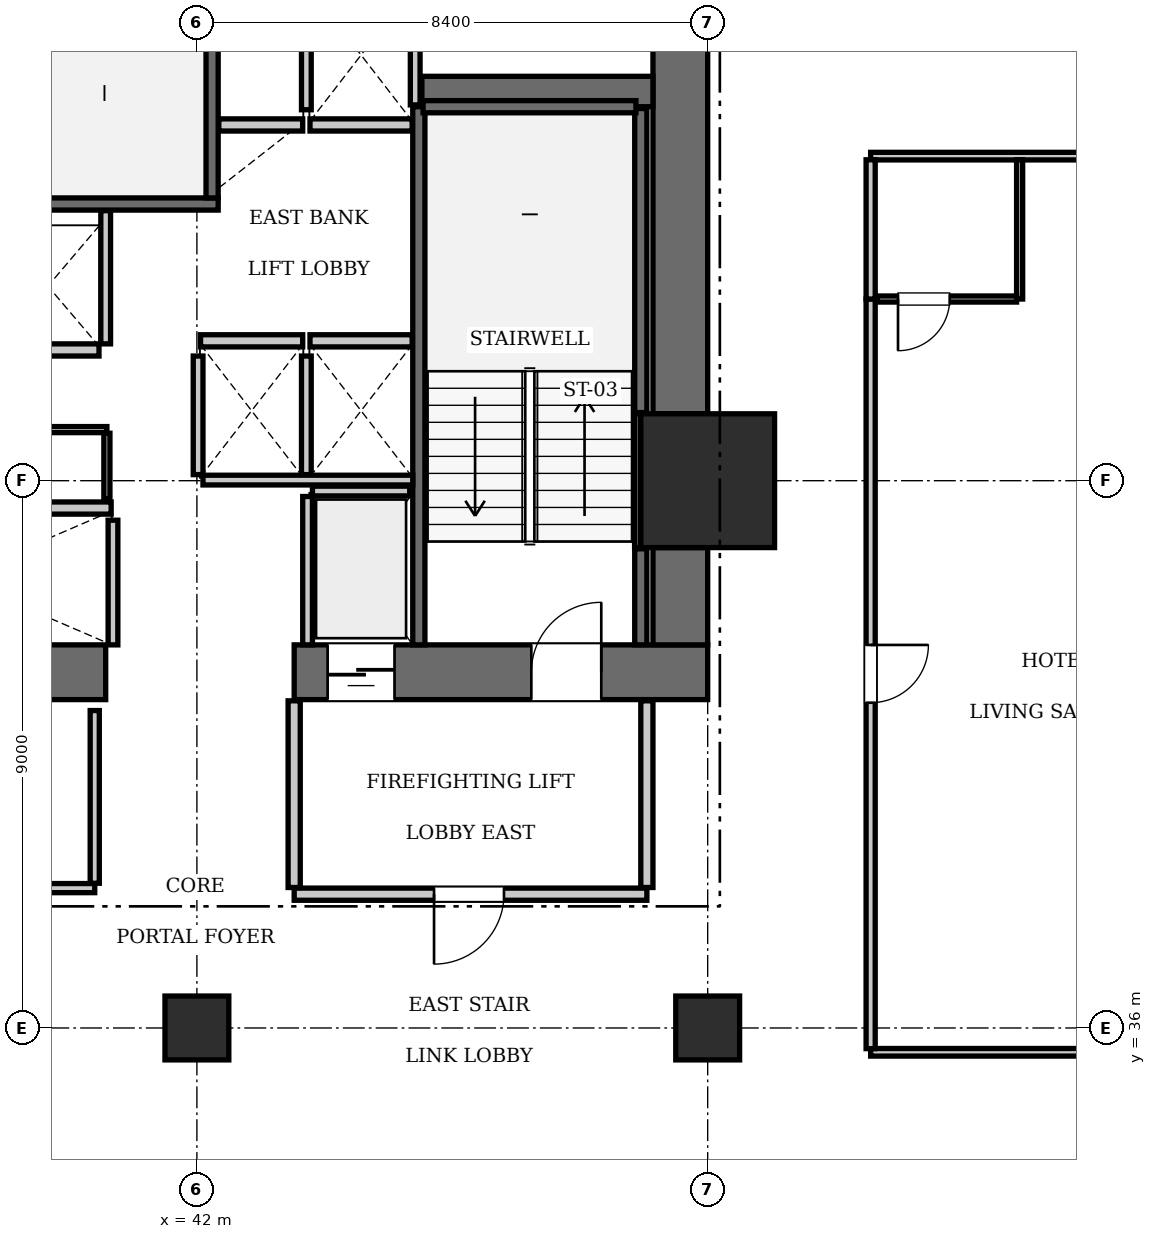
"""IFC4 building model, lengths in metres.
Left out: names, types, materials, properties, quantities, classifications, styles, units other than length and angle.
Written with IfcOpenShell. Run it as: python <this file> out.ifc"""

import sys

from ifc_helpers import new_model, si_unit, direction, frame, frame_2d, origin, origin_2d, place, context, subcontext, project, spatial, rectangle, extrude, element, fill, save


model = new_model("IFC4")
c1 = context("Model", 3, precision=1e-05, world=origin(), true_north=direction((0.0, 1.0)))
c2 = subcontext(c1, "Body", "Model", "MODEL_VIEW")
j1 = project(units=[si_unit("LENGTHUNIT", "METRE"), si_unit("PLANEANGLEUNIT", "RADIAN")], contexts=[c1])
p1 = place(None, origin())
s1 = spatial("IfcSite", under=j1, at=p1, CompositionType="ELEMENT")
p2 = place(p1, origin())
s2 = spatial("IfcBuilding", under=s1, at=p2, CompositionType="ELEMENT")
p3 = place(p2, frame((0.0, 0.0, 65.45)))
s3 = spatial("IfcBuildingStorey", under=s2, at=p3, CompositionType="ELEMENT", Elevation=65.45)
p4 = place(p3, frame((50.4, 45.0, 0.0), z_axis=(0.0, 0.0, 1.0), x_axis=(1.0, 0.0, 0.0)))
e1 = element("IfcColumn", 1, at=p4, inside=s3, PredefinedType="COLUMN", context=c2, shape_type="SweptSolid", body=[
    extrude(rectangle(XDim=2.2, YDim=2.2, at=origin_2d()), origin(), (0.0, 0.0, 1.0), 3.85),
])
p5 = place(p3, frame((35.1, 41.85, 0.0), z_axis=(0.0, 0.0, 1.0), x_axis=(1.0, 0.0, 0.0)))
e2 = element("IfcWall", 2, at=p5, inside=s3, PredefinedType="SHEAR", context=c2, shape_type="SweptSolid", body=[
    extrude(rectangle(XDim=5.4, YDim=0.9, at=frame_2d((2.7, 0.0))), origin(), (0.0, 0.0, 1.0), 3.85),
])
p6 = place(p3, frame((43.6, 41.85, 0.0), z_axis=(0.0, 0.0, 1.0), x_axis=(1.0, 0.0, 0.0)))
e3 = element("IfcWall", 3, at=p6, inside=s3, PredefinedType="SHEAR", context=c2, shape_type="SweptSolid", body=[
    extrude(rectangle(XDim=6.8, YDim=0.9, at=frame_2d((3.4, 0.0))), origin(), (0.0, 0.0, 1.0), 3.85),
])
p7 = place(p6, frame((3.9, 0.0, 0.0)))
e4 = element("IfcOpeningElement", 4, at=p7, cuts=e3, PredefinedType="OPENING", context=c2, shape_type="SweptSolid", body=[
    extrude(rectangle(XDim=1.15, YDim=2.15, at=frame_2d((0.575, 1.075))), frame((0.0, 0.46, 0.0), z_axis=(0.0, -1.0, 0.0), x_axis=(1.0, 0.0, 0.0)), (0.0, 0.0, 1.0), 0.92),
])
p8 = place(p6, frame((0.55, 0.0, 0.0)))
e5 = element("IfcOpeningElement", 5, at=p8, cuts=e3, PredefinedType="OPENING", context=c2, shape_type="SweptSolid", body=[
    extrude(rectangle(XDim=1.1, YDim=2.2, at=frame_2d((0.55, 1.1))), frame((0.0, 0.46, 0.0), z_axis=(0.0, -1.0, 0.0), x_axis=(1.0, 0.0, 0.0)), (0.0, 0.0, 1.0), 0.92),
])
p9 = place(p3, frame((49.95, 42.3, 0.0), z_axis=(0.0, 0.0, 1.0), x_axis=(0.0, 1.0, 0.0)))
e6 = element("IfcWall", 6, at=p9, inside=s3, PredefinedType="SHEAR", context=c2, shape_type="SweptSolid", body=[
    extrude(rectangle(XDim=1.6, YDim=0.9, at=frame_2d((0.8, 0.0))), origin(), (0.0, 0.0, 1.0), 3.85),
])
p10 = place(p3, frame((49.95, 46.1, 0.0), z_axis=(0.0, 0.0, 1.0), x_axis=(0.0, 1.0, 0.0)))
e7 = element("IfcWall", 7, at=p10, inside=s3, PredefinedType="SHEAR", context=c2, shape_type="SweptSolid", body=[
    extrude(rectangle(XDim=7.0, YDim=0.9, at=frame_2d((3.5, 0.0))), origin(), (0.0, 0.0, 1.0), 3.85),
])
p11 = place(p3, frame((45.7, 51.4, 0.0), z_axis=(0.0, 0.0, 1.0), x_axis=(1.0, 0.0, 0.0)))
e8 = element("IfcWall", 8, at=p11, inside=s3, PredefinedType="SHEAR", context=c2, shape_type="SweptSolid", body=[
    extrude(rectangle(XDim=3.8, YDim=0.5, at=frame_2d((1.9, 0.0))), origin(), (0.0, 0.0, 1.0), 3.85),
])
for number, where, z_axis, x_axis in (
    (9, (42.0, 36.0, 0.0), (0.0, 0.0, 1.0), (1.0, 0.0, 0.0)),
    (10, (50.4, 36.0, 0.0), (0.0, 0.0, 1.0), (1.0, 0.0, 0.0)),
):
    element("IfcColumn", number, at=place(p3, frame(where, z_axis=z_axis, x_axis=x_axis)), inside=s3, PredefinedType="COLUMN", context=c2, shape_type="SweptSolid", body=[
        extrude(rectangle(XDim=1.05, YDim=1.05, at=origin_2d()), origin(), (0.0, 0.0, 1.0), 3.85),
    ])
p12 = place(p3, frame((33.25, 49.55, 0.0), z_axis=(0.0, 0.0, 1.0), x_axis=(1.0, 0.0, 0.0)))
e11 = element("IfcWall", 11, at=p12, inside=s3, PredefinedType="SOLIDWALL", context=c2, shape_type="SweptSolid", body=[
    extrude(rectangle(XDim=9.1, YDim=0.2, at=frame_2d((4.55, 0.0))), origin(), (0.0, 0.0, 1.0), 3.61),
])
p13 = place(p3, frame((42.25, 49.65, 0.0), z_axis=(0.0, 0.0, 1.0), x_axis=(0.0, 1.0, 0.0)))
e12 = element("IfcWall", 12, at=p13, inside=s3, PredefinedType="SOLIDWALL", context=c2, shape_type="SweptSolid", body=[
    extrude(rectangle(XDim=3.45, YDim=0.2, at=frame_2d((1.725, 0.0))), origin(), (0.0, 0.0, 1.0), 3.61),
])
p14 = place(p3, frame((45.65, 42.3, 0.0), z_axis=(0.0, 0.0, 1.0), x_axis=(0.0, 1.0, 0.0)))
e13 = element("IfcWall", 13, at=p14, inside=s3, PredefinedType="SOLIDWALL", context=c2, shape_type="SweptSolid", body=[
    extrude(rectangle(XDim=8.85, YDim=0.2, at=frame_2d((4.425, 0.0))), origin(), (0.0, 0.0, 1.0), 3.61),
])
p15 = place(p3, frame((49.3, 42.3, 0.0), z_axis=(0.0, 0.0, 1.0), x_axis=(0.0, 1.0, 0.0)))
e14 = element("IfcWall", 14, at=p15, inside=s3, PredefinedType="SOLIDWALL", context=c2, shape_type="SweptSolid", body=[
    extrude(rectangle(XDim=1.58, YDim=0.2, at=frame_2d((0.79, 0.0))), origin(), (0.0, 0.0, 1.0), 3.61),
])
p16 = place(p3, frame((49.3, 46.12, 0.0), z_axis=(0.0, 0.0, 1.0), x_axis=(0.0, 1.0, 0.0)))
e15 = element("IfcWall", 15, at=p16, inside=s3, PredefinedType="SOLIDWALL", context=c2, shape_type="SweptSolid", body=[
    extrude(rectangle(XDim=5.0, YDim=0.2, at=frame_2d((2.5, 0.0))), origin(), (0.0, 0.0, 1.0), 3.61),
])
p17 = place(p3, frame((45.72, 51.15, 0.0), z_axis=(0.0, 0.0, 1.0), x_axis=(1.0, 0.0, 0.0)))
e16 = element("IfcWall", 16, at=p17, inside=s3, PredefinedType="SOLIDWALL", context=c2, shape_type="SweptSolid", body=[
    extrude(rectangle(XDim=3.5, YDim=0.2, at=frame_2d((1.75, 0.0))), origin(), (0.0, 0.0, 1.0), 3.61),
])
p18 = place(p3, frame((49.248, 43.9, 0.0), z_axis=(0.0, 0.0, 1.0), x_axis=(0.0, 1.0, 0.0)))
e17 = element("IfcWall", 17, at=p18, inside=s3, PredefinedType="SOLIDWALL", context=c2, shape_type="SweptSolid", body=[
    extrude(rectangle(XDim=2.2, YDim=0.1, at=frame_2d((1.1, 0.0))), origin(), (0.0, 0.0, 1.0), 3.61),
])
for number, where, z_axis, x_axis in (
    (18, (42.06, 47.3, 0.0), (0.0, 0.0, 1.0), (1.0, 0.0, 0.0)),
    (19, (43.86, 47.3, 0.0), (0.0, 0.0, 1.0), (1.0, 0.0, 0.0)),
):
    element("IfcWall", number, at=place(p3, frame(where, z_axis=z_axis, x_axis=x_axis)), inside=s3, PredefinedType="SOLIDWALL", context=c2, shape_type="SweptSolid", body=[
        extrude(rectangle(XDim=1.68, YDim=0.2, at=frame_2d((0.84, 0.0))), origin(), (0.0, 0.0, 1.0), 3.61),
    ])
p19 = place(p3, frame((42.36, 50.85, 0.0), z_axis=(0.0, 0.0, 1.0), x_axis=(1.0, 0.0, 0.0)))
e20 = element("IfcWall", 20, at=p19, inside=s3, PredefinedType="SOLIDWALL", context=c2, shape_type="SweptSolid", body=[
    extrude(rectangle(XDim=1.38, YDim=0.2, at=frame_2d((0.69, 0.0))), origin(), (0.0, 0.0, 1.0), 3.61),
])
p20 = place(p3, frame((43.86, 50.85, 0.0), z_axis=(0.0, 0.0, 1.0), x_axis=(1.0, 0.0, 0.0)))
e21 = element("IfcWall", 21, at=p20, inside=s3, PredefinedType="SOLIDWALL", context=c2, shape_type="SweptSolid", body=[
    extrude(rectangle(XDim=1.68, YDim=0.2, at=frame_2d((0.84, 0.0))), origin(), (0.0, 0.0, 1.0), 3.61),
])
p21 = place(p3, frame((38.91, 44.55, 0.0), z_axis=(0.0, 0.0, 1.0), x_axis=(1.0, 0.0, 0.0)))
e22 = element("IfcWall", 22, at=p21, inside=s3, PredefinedType="SOLIDWALL", context=c2, shape_type="SweptSolid", body=[
    extrude(rectangle(XDim=1.68, YDim=0.2, at=frame_2d((0.84, 0.0))), origin(), (0.0, 0.0, 1.0), 3.61),
])
p22 = place(p3, frame((38.71, 47.15, 0.0), z_axis=(0.0, 0.0, 1.0), x_axis=(1.0, 0.0, 0.0)))
e23 = element("IfcWall", 23, at=p22, inside=s3, PredefinedType="SOLIDWALL", context=c2, shape_type="SweptSolid", body=[
    extrude(rectangle(XDim=1.68, YDim=0.2, at=frame_2d((0.84, 0.0))), origin(), (0.0, 0.0, 1.0), 3.61),
])
p23 = place(p3, frame((43.9, 44.83, 0.0), z_axis=(0.0, 0.0, 1.0), x_axis=(1.0, 0.0, 0.0)))
e24 = element("IfcWall", 24, at=p23, inside=s3, PredefinedType="SOLIDWALL", context=c2, shape_type="SweptSolid", body=[
    extrude(rectangle(XDim=1.6, YDim=0.16, at=frame_2d((0.8, 0.0))), origin(), (0.0, 0.0, 1.0), 3.61),
])
p24 = place(p3, frame((43.82, 42.3, 0.0), z_axis=(0.0, 0.0, 1.0), x_axis=(0.0, 1.0, 0.0)))
e25 = element("IfcWall", 25, at=p24, inside=s3, PredefinedType="SOLIDWALL", context=c2, shape_type="SweptSolid", body=[
    extrude(rectangle(XDim=2.44, YDim=0.16, at=frame_2d((1.22, 0.0))), origin(), (0.0, 0.0, 1.0), 3.61),
])
for number, where, z_axis, x_axis in (
    (26, (42.02, 45.1, 0.0), (0.0, 0.0, 1.0), (0.0, 1.0, 0.0)),
    (27, (43.8, 45.1, 0.0), (0.0, 0.0, 1.0), (0.0, 1.0, 0.0)),
):
    element("IfcWall", number, at=place(p3, frame(where, z_axis=z_axis, x_axis=x_axis)), inside=s3, PredefinedType="SOLIDWALL", context=c2, shape_type="SweptSolid", body=[
        extrude(rectangle(XDim=1.95, YDim=0.16, at=frame_2d((0.975, 0.0))), origin(), (0.0, 0.0, 1.0), 3.61),
    ])
p25 = place(p3, frame((42.1, 45.01, 0.0), z_axis=(0.0, 0.0, 1.0), x_axis=(1.0, 0.0, 0.0)))
e28 = element("IfcWall", 28, at=p25, inside=s3, PredefinedType="SOLIDWALL", context=c2, shape_type="SweptSolid", body=[
    extrude(rectangle(XDim=3.45, YDim=0.16, at=frame_2d((1.725, 0.0))), origin(), (0.0, 0.0, 1.0), 3.61),
])
p26 = place(p3, frame((45.59, 51.18, 0.0), z_axis=(0.0, 0.0, 1.0), x_axis=(0.0, 1.0, 0.0)))
e29 = element("IfcWall", 29, at=p26, inside=s3, PredefinedType="SOLIDWALL", context=c2, shape_type="SweptSolid", body=[
    extrude(rectangle(XDim=1.92, YDim=0.16, at=frame_2d((0.96, 0.0))), origin(), (0.0, 0.0, 1.0), 3.61),
])
p27 = place(p3, frame((43.8, 51.1, 0.0), z_axis=(0.0, 0.0, 1.0), x_axis=(0.0, 1.0, 0.0)))
e30 = element("IfcWall", 30, at=p27, inside=s3, PredefinedType="SOLIDWALL", context=c2, shape_type="SweptSolid", body=[
    extrude(rectangle(XDim=2.0, YDim=0.16, at=frame_2d((1.0, 0.0))), origin(), (0.0, 0.0, 1.0), 3.61),
])
p28 = place(p3, frame((40.62, 42.3, 0.0), z_axis=(0.0, 0.0, 1.0), x_axis=(0.0, 1.0, 0.0)))
e31 = element("IfcWall", 31, at=p28, inside=s3, PredefinedType="SOLIDWALL", context=c2, shape_type="SweptSolid", body=[
    extrude(rectangle(XDim=2.05, YDim=0.16, at=frame_2d((1.025, 0.0))), origin(), (0.0, 0.0, 1.0), 3.61),
])
p29 = place(p3, frame((40.5, 47.25, 0.0), z_axis=(0.0, 0.0, 1.0), x_axis=(0.0, 1.0, 0.0)))
e32 = element("IfcWall", 32, at=p29, inside=s3, PredefinedType="SOLIDWALL", context=c2, shape_type="SweptSolid", body=[
    extrude(rectangle(XDim=2.19, YDim=0.16, at=frame_2d((1.095, 0.0))), origin(), (0.0, 0.0, 1.0), 3.61),
])
p30 = place(p3, frame((43.6, 38.2, 0.0), z_axis=(0.0, 0.0, 1.0), x_axis=(1.0, 0.0, 0.0)))
e33 = element("IfcWall", 33, at=p30, inside=s3, PredefinedType="PARTITIONING", context=c2, shape_type="SweptSolid", body=[
    extrude(rectangle(XDim=5.8, YDim=0.2, at=frame_2d((2.9, 0.0))), origin(), (0.0, 0.0, 1.0), 3.61),
])
p31 = place(p30, frame((2.3, 0.0, 0.0)))
e34 = element("IfcOpeningElement", 34, at=p31, cuts=e33, PredefinedType="OPENING", context=c2, shape_type="SweptSolid", body=[
    extrude(rectangle(XDim=1.15, YDim=2.15, at=frame_2d((0.575, 1.075))), frame((0.0, 0.11, 0.0), z_axis=(0.0, -1.0, 0.0), x_axis=(1.0, 0.0, 0.0)), (0.0, 0.0, 1.0), 0.22),
])
for number, where, z_axis, x_axis in (
    (35, (43.6, 38.31, 0.0), (0.0, 0.0, 1.0), (0.0, 1.0, 0.0)),
    (36, (49.4, 38.31, 0.0), (0.0, 0.0, 1.0), (0.0, 1.0, 0.0)),
):
    element("IfcWall", number, at=place(p3, frame(where, z_axis=z_axis, x_axis=x_axis)), inside=s3, PredefinedType="PARTITIONING", context=c2, shape_type="SweptSolid", body=[
        extrude(rectangle(XDim=3.07, YDim=0.2, at=frame_2d((1.535, 0.0))), origin(), (0.0, 0.0, 1.0), 3.61),
    ])
p32 = place(p3, frame((35.58, 45.84, 0.0), z_axis=(0.0, 0.0, 1.0), x_axis=(1.0, 0.0, 0.0)))
e37 = element("IfcWall", 37, at=p32, inside=s3, PredefinedType="PARTITIONING", context=c2, shape_type="SweptSolid", body=[
    extrude(rectangle(XDim=4.94, YDim=0.1, at=frame_2d((2.47, 0.0))), origin(), (0.0, 0.0, 1.0), 3.61),
])
p33 = place(p32, frame((1.8, 0.0, 0.0)))
e38 = element("IfcOpeningElement", 38, at=p33, cuts=e37, PredefinedType="OPENING", context=c2, shape_type="SweptSolid", body=[
    extrude(rectangle(XDim=0.8, YDim=2.05, at=frame_2d((0.4, 1.025))), frame((0.0, 0.06, 0.0), z_axis=(0.0, -1.0, 0.0), x_axis=(1.0, 0.0, 0.0)), (0.0, 0.0, 1.0), 0.12),
])
p34 = place(p3, frame((40.52, 44.7, 0.0), z_axis=(0.0, 0.0, 1.0), x_axis=(0.0, 1.0, 0.0)))
e39 = element("IfcWall", 39, at=p34, inside=s3, PredefinedType="PARTITIONING", context=c2, shape_type="SweptSolid", body=[
    extrude(rectangle(XDim=1.08, YDim=0.1, at=frame_2d((0.54, 0.0))), origin(), (0.0, 0.0, 1.0), 3.61),
])
p35 = place(p3, frame((34.4, 38.3, 0.0), z_axis=(0.0, 0.0, 1.0), x_axis=(1.0, 0.0, 0.0)))
e40 = element("IfcWall", 40, at=p35, inside=s3, PredefinedType="PARTITIONING", context=c2, shape_type="SweptSolid", body=[
    extrude(rectangle(XDim=5.92, YDim=0.15, at=frame_2d((2.96, 0.0))), origin(), (0.0, 0.0, 1.0), 3.61),
])
p36 = place(p35, frame((2.4, 0.0, 0.0)))
e41 = element("IfcOpeningElement", 41, at=p36, cuts=e40, PredefinedType="OPENING", context=c2, shape_type="SweptSolid", body=[
    extrude(rectangle(XDim=0.9, YDim=2.1, at=frame_2d((0.45, 1.05))), frame((0.0, 0.085, 0.0), z_axis=(0.0, -1.0, 0.0), x_axis=(1.0, 0.0, 0.0)), (0.0, 0.0, 1.0), 0.17),
])
p37 = place(p3, frame((40.32, 38.38, 0.0), z_axis=(0.0, 0.0, 1.0), x_axis=(0.0, 1.0, 0.0)))
e42 = element("IfcWall", 42, at=p37, inside=s3, PredefinedType="PARTITIONING", context=c2, shape_type="SweptSolid", body=[
    extrude(rectangle(XDim=2.84, YDim=0.15, at=frame_2d((1.42, 0.0))), origin(), (0.0, 0.0, 1.0), 3.61),
])
p38 = place(p3, frame((53.08, 35.6, 0.0), z_axis=(0.0, 0.0, 1.0), x_axis=(1.0, 0.0, 0.0)))
e43 = element("IfcWall", 43, at=p38, inside=s3, PredefinedType="PARTITIONING", context=c2, shape_type="SweptSolid", body=[
    extrude(rectangle(XDim=11.62, YDim=0.125, at=frame_2d((5.81, 0.0))), origin(), (0.0, 0.0, 1.0), 3.61),
])
p39 = place(p3, frame((53.08, 50.337, 0.0), z_axis=(0.0, 0.0, 1.0), x_axis=(1.0, 0.0, 0.0)))
e44 = element("IfcWall", 44, at=p39, inside=s3, PredefinedType="PARTITIONING", context=c2, shape_type="SweptSolid", body=[
    extrude(rectangle(XDim=8.38, YDim=0.125, at=frame_2d((4.19, 0.0))), origin(), (0.0, 0.0, 1.0), 3.61),
])
p40 = place(p3, frame((53.08, 35.66, 0.0), z_axis=(0.0, 0.0, 1.0), x_axis=(0.0, 1.0, 0.0)))
e45 = element("IfcWall", 45, at=p40, inside=s3, PredefinedType="PARTITIONING", context=c2, shape_type="SweptSolid", body=[
    extrude(rectangle(XDim=12.328, YDim=0.15, at=frame_2d((6.164, 0.0))), origin(), (0.0, 0.0, 1.0), 3.61),
])
p41 = place(p40, frame((5.689, 0.0, 0.0)))
e46 = element("IfcOpeningElement", 46, at=p41, cuts=e45, PredefinedType="OPENING", context=c2, shape_type="SweptSolid", body=[
    extrude(rectangle(XDim=0.95, YDim=2.15, at=frame_2d((0.475, 1.075))), frame((0.0, 0.085, 0.0), z_axis=(0.0, -1.0, 0.0), x_axis=(1.0, 0.0, 0.0)), (0.0, 0.0, 1.0), 0.17),
])
p42 = place(p3, frame((53.08, 47.988, 0.0), z_axis=(0.0, 0.0, 1.0), x_axis=(0.0, 1.0, 0.0)))
e47 = element("IfcWall", 47, at=p42, inside=s3, PredefinedType="PARTITIONING", context=c2, shape_type="SweptSolid", body=[
    extrude(rectangle(XDim=2.29, YDim=0.15, at=frame_2d((1.145, 0.0))), origin(), (0.0, 0.0, 1.0), 3.61),
])
p43 = place(p3, frame((55.53, 47.988, 0.0), z_axis=(0.0, 0.0, 1.0), x_axis=(0.0, 1.0, 0.0)))
e48 = element("IfcWall", 48, at=p43, inside=s3, PredefinedType="PARTITIONING", context=c2, shape_type="SweptSolid", body=[
    extrude(rectangle(XDim=2.29, YDim=0.1, at=frame_2d((1.145, 0.0))), origin(), (0.0, 0.0, 1.0), 3.61),
])
p44 = place(p3, frame((53.18, 47.988, 0.0), z_axis=(0.0, 0.0, 1.0), x_axis=(1.0, 0.0, 0.0)))
e49 = element("IfcWall", 49, at=p44, inside=s3, PredefinedType="PARTITIONING", context=c2, shape_type="SweptSolid", body=[
    extrude(rectangle(XDim=2.3, YDim=0.1, at=frame_2d((1.15, 0.0))), origin(), (0.0, 0.0, 1.0), 3.61),
])
p45 = place(p44, frame((0.35, 0.0, 0.0)))
e50 = element("IfcOpeningElement", 50, at=p45, cuts=e49, PredefinedType="OPENING", context=c2, shape_type="SweptSolid", body=[
    extrude(rectangle(XDim=0.85, YDim=2.1, at=frame_2d((0.425, 1.05))), frame((0.0, 0.06, 0.0), z_axis=(0.0, -1.0, 0.0), x_axis=(1.0, 0.0, 0.0)), (0.0, 0.0, 1.0), 0.12),
])
p46 = place(p7, origin())
e51 = element("IfcDoor", 51, at=p46, inside=s3, OperationType="SINGLE_SWING_RIGHT", PredefinedType="DOOR", context=c2, shape_type="SweptSolid", body=[
    extrude(rectangle(XDim=1.15, YDim=2.15, at=frame_2d((0.575, 1.075))), frame((0.0, 0.025, 0.0), z_axis=(0.0, -1.0, 0.0), x_axis=(1.0, 0.0, 0.0)), (0.0, 0.0, 1.0), 0.05),
])
fill(e4, e51)
p47 = place(p8, frame((1.1, 0.0, 0.0), z_axis=(0.0, 0.0, 1.0), x_axis=(-1.0, 0.0, 0.0)))
e52 = element("IfcDoor", 52, at=p47, inside=s3, OperationType="SLIDING_TO_LEFT", PredefinedType="DOOR", context=c2, shape_type="SweptSolid", body=[
    extrude(rectangle(XDim=1.1, YDim=2.2, at=frame_2d((0.55, 1.1))), frame((0.0, 0.025, 0.0), z_axis=(0.0, -1.0, 0.0), x_axis=(1.0, 0.0, 0.0)), (0.0, 0.0, 1.0), 0.05),
])
fill(e5, e52)
p48 = place(p31, frame((1.15, 0.0, 0.0), z_axis=(0.0, 0.0, 1.0), x_axis=(-1.0, 0.0, 0.0)))
e53 = element("IfcDoor", 53, at=p48, inside=s3, OperationType="SINGLE_SWING_RIGHT", PredefinedType="DOOR", context=c2, shape_type="SweptSolid", body=[
    extrude(rectangle(XDim=1.15, YDim=2.15, at=frame_2d((0.575, 1.075))), frame((0.0, 0.025, 0.0), z_axis=(0.0, -1.0, 0.0), x_axis=(1.0, 0.0, 0.0)), (0.0, 0.0, 1.0), 0.05),
])
fill(e34, e53)
p49 = place(p45, frame((0.85, 0.0, 0.0), z_axis=(0.0, 0.0, 1.0), x_axis=(-1.0, 0.0, 0.0)))
e54 = element("IfcDoor", 54, at=p49, inside=s3, OperationType="SINGLE_SWING_RIGHT", PredefinedType="DOOR", context=c2, shape_type="SweptSolid", body=[
    extrude(rectangle(XDim=0.85, YDim=2.1, at=frame_2d((0.425, 1.05))), frame((0.0, 0.025, 0.0), z_axis=(0.0, -1.0, 0.0), x_axis=(1.0, 0.0, 0.0)), (0.0, 0.0, 1.0), 0.05),
])
fill(e50, e54)
p50 = place(p41, frame((0.95, 0.0, 0.0), z_axis=(0.0, 0.0, 1.0), x_axis=(-1.0, 0.0, 0.0)))
e55 = element("IfcDoor", 55, at=p50, inside=s3, OperationType="SINGLE_SWING_LEFT", PredefinedType="DOOR", context=c2, shape_type="SweptSolid", body=[
    extrude(rectangle(XDim=0.95, YDim=2.15, at=frame_2d((0.475, 1.075))), frame((0.0, 0.025, 0.0), z_axis=(0.0, -1.0, 0.0), x_axis=(1.0, 0.0, 0.0)), (0.0, 0.0, 1.0), 0.05),
])
fill(e46, e55)
save(model, sys.argv[1])
